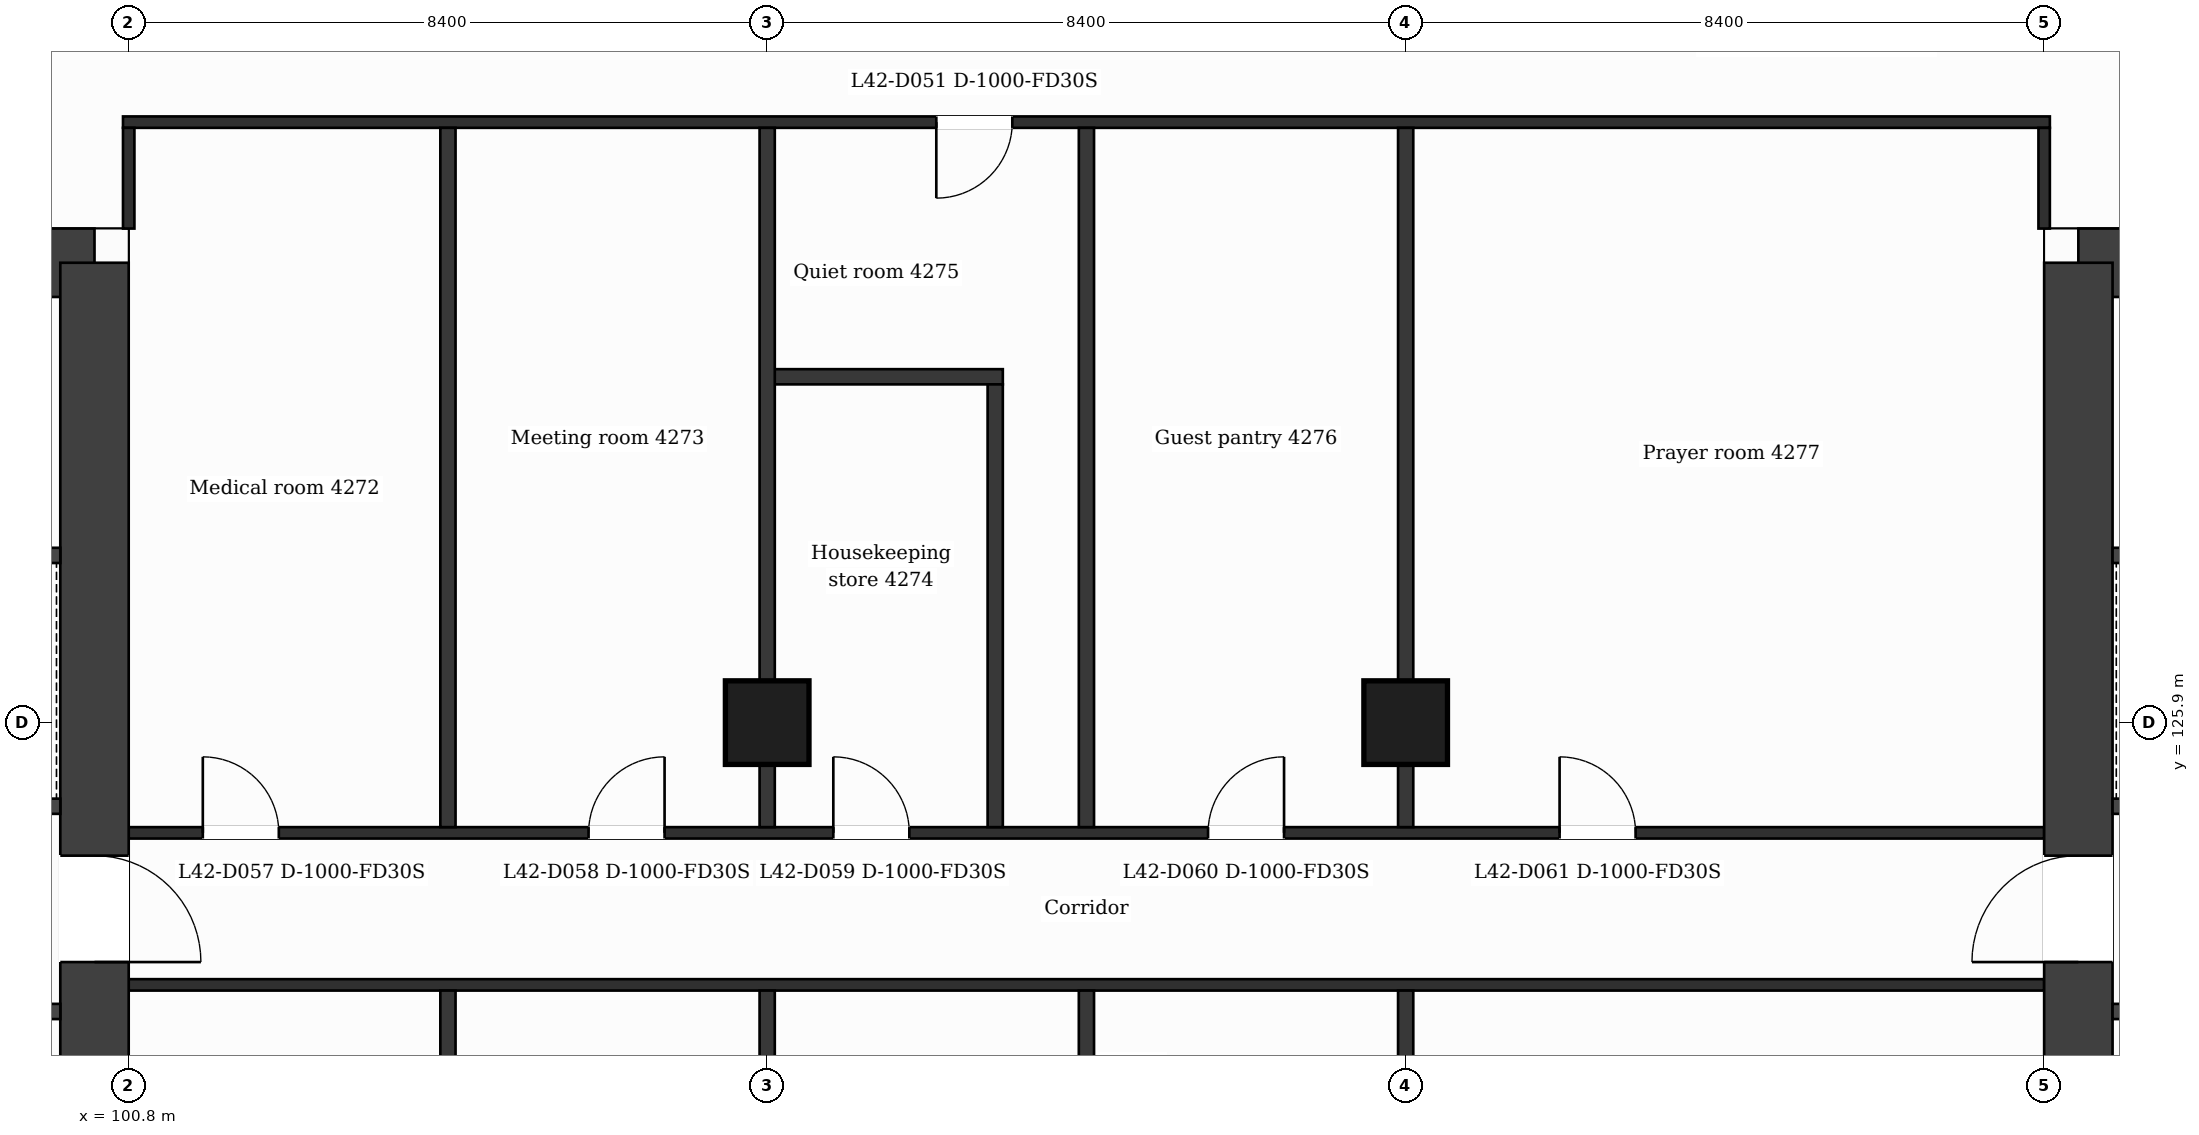
"""IFC4 building model, lengths in metres.
Left out: names, types, materials, properties, quantities, classifications, styles, units other than length and angle.
Written with IfcOpenShell. Run it as: python <this file> out.ifc"""

import sys

from ifc_helpers import new_model, si_unit, direction, frame, frame_2d, origin, origin_2d, place, context, subcontext, project, spatial, rectangle, extrude, element, fill, save


model = new_model("IFC4")
c1 = context("Model", 3, precision=1e-05, world=origin(), true_north=direction((0.0, 1.0)))
c2 = subcontext(c1, "Body", "Model", "MODEL_VIEW")
j1 = project(units=[si_unit("LENGTHUNIT", "METRE"), si_unit("PLANEANGLEUNIT", "RADIAN")], contexts=[c1])
p1 = place(None, origin())
s1 = spatial("IfcSite", under=j1, at=p1, CompositionType="ELEMENT")
p2 = place(p1, origin())
s2 = spatial("IfcBuilding", under=s1, at=p2, CompositionType="ELEMENT")
p3 = place(p2, frame((0.0, 0.0, 177.4)))
s3 = spatial("IfcBuildingStorey", under=s2, at=p3, CompositionType="ELEMENT", Elevation=177.4)
p4 = place(p3, frame((89.024, 131.95, 0.0), z_axis=(0.0, 0.0, 1.0), x_axis=(1.0, 0.0, 0.0)))
e1 = element("IfcWall", 1, at=p4, inside=s3, PredefinedType="SHEAR", context=c2, shape_type="SweptSolid", body=[
    extrude(rectangle(XDim=11.326, YDim=0.9, at=frame_2d((5.663, 0.0))), origin(), (0.0, 0.0, 1.0), 3.7),
])
p5 = place(p4, frame((6.739, 0.0, 0.0)))
e2 = element("IfcOpeningElement", 2, at=p5, cuts=e1, PredefinedType="OPENING", context=c2, shape_type="SweptSolid", body=[
    extrude(rectangle(XDim=1.2, YDim=2.1, at=frame_2d((0.6, 1.05))), frame((0.0, 0.46, 0.0), z_axis=(0.0, -1.0, 0.0), x_axis=(1.0, 0.0, 0.0)), (0.0, 0.0, 1.0), 0.92),
])
p6 = place(p3, frame((100.35, 131.95, 0.0), z_axis=(0.0, 0.0, 1.0), x_axis=(0.0, -1.0, 0.0)))
e3 = element("IfcWall", 3, at=p6, inside=s3, PredefinedType="SHEAR", context=c2, shape_type="SweptSolid", body=[
    extrude(rectangle(XDim=21.1, YDim=0.9, at=frame_2d((10.55, 0.0))), origin(), (0.0, 0.0, 1.0), 3.7),
])
p7 = place(p6, frame((7.8, 0.0, 0.0)))
e4 = element("IfcOpeningElement", 4, at=p7, cuts=e3, PredefinedType="OPENING", context=c2, shape_type="SweptSolid", body=[
    extrude(rectangle(XDim=1.4, YDim=2.1, at=frame_2d((0.7, 1.05))), frame((0.0, 0.46, 0.0), z_axis=(0.0, -1.0, 0.0), x_axis=(1.0, 0.0, 0.0)), (0.0, 0.0, 1.0), 0.92),
])
p8 = place(p3, frame((126.45, 131.95, 0.0), z_axis=(0.0, 0.0, 1.0), x_axis=(1.0, 0.0, 0.0)))
e5 = element("IfcWall", 5, at=p8, inside=s3, PredefinedType="SHEAR", context=c2, shape_type="SweptSolid", body=[
    extrude(rectangle(XDim=11.326, YDim=0.9, at=frame_2d((5.663, 0.0))), origin(), (0.0, 0.0, 1.0), 3.7),
])
p9 = place(p8, frame((3.386, 0.0, 0.0)))
e6 = element("IfcOpeningElement", 6, at=p9, cuts=e5, PredefinedType="OPENING", context=c2, shape_type="SweptSolid", body=[
    extrude(rectangle(XDim=1.2, YDim=2.1, at=frame_2d((0.6, 1.05))), frame((0.0, 0.46, 0.0), z_axis=(0.0, -1.0, 0.0), x_axis=(1.0, 0.0, 0.0)), (0.0, 0.0, 1.0), 0.92),
])
p10 = place(p3, frame((126.45, 110.85, 0.0), z_axis=(0.0, 0.0, 1.0), x_axis=(0.0, 1.0, 0.0)))
e7 = element("IfcWall", 7, at=p10, inside=s3, PredefinedType="SHEAR", context=c2, shape_type="SweptSolid", body=[
    extrude(rectangle(XDim=21.1, YDim=0.9, at=frame_2d((10.55, 0.0))), origin(), (0.0, 0.0, 1.0), 3.7),
])
p11 = place(p10, frame((11.9, 0.0, 0.0)))
e8 = element("IfcOpeningElement", 8, at=p11, cuts=e7, PredefinedType="OPENING", context=c2, shape_type="SweptSolid", body=[
    extrude(rectangle(XDim=1.4, YDim=2.1, at=frame_2d((0.7, 1.05))), frame((0.0, 0.46, 0.0), z_axis=(0.0, -1.0, 0.0), x_axis=(1.0, 0.0, 0.0)), (0.0, 0.0, 1.0), 0.92),
])
for number, where, z_axis, x_axis in (
    (9, (109.2, 125.9, 0.0), (0.0, 0.0, 1.0), (1.0, 0.0, 0.0)),
    (10, (117.6, 125.9, 0.0), (0.0, 0.0, 1.0), (1.0, 0.0, 0.0)),
):
    element("IfcColumn", number, at=place(p3, frame(where, z_axis=z_axis, x_axis=x_axis)), inside=s3, PredefinedType="COLUMN", context=c2, shape_type="SweptSolid", body=[
        extrude(rectangle(XDim=1.1, YDim=1.1, at=origin_2d()), origin(), (0.0, 0.0, 1.0), 3.7),
    ])
p12 = place(p3, frame((95.227, 122.1, 0.0), z_axis=(0.0, 0.0, 1.0), x_axis=(1.0, 0.0, 0.0)))
e11 = element("IfcWall", 11, at=p12, inside=s3, PredefinedType="PARTITIONING", context=c2, shape_type="SweptSolid", body=[
    extrude(rectangle(XDim=4.673, YDim=0.2, at=frame_2d((2.336, 0.0))), origin(), (0.0, 0.0, 1.0), 3.38),
])
p13 = place(p12, frame((0.902, 0.0, 0.0)))
e12 = element("IfcOpeningElement", 12, at=p13, cuts=e11, PredefinedType="OPENING", context=c2, shape_type="SweptSolid", body=[
    extrude(rectangle(XDim=0.9, YDim=2.1, at=frame_2d((0.45, 1.05))), frame((0.0, 0.11, 0.0), z_axis=(0.0, -1.0, 0.0), x_axis=(1.0, 0.0, 0.0)), (0.0, 0.0, 1.0), 0.22),
])
p14 = place(p12, frame((3.128, 0.0, 0.0)))
e13 = element("IfcOpeningElement", 13, at=p14, cuts=e11, PredefinedType="OPENING", context=c2, shape_type="SweptSolid", body=[
    extrude(rectangle(XDim=0.9, YDim=2.1, at=frame_2d((0.45, 1.05))), frame((0.0, 0.11, 0.0), z_axis=(0.0, -1.0, 0.0), x_axis=(1.0, 0.0, 0.0)), (0.0, 0.0, 1.0), 0.22),
])
p15 = place(p3, frame((126.9, 122.1, 0.0), z_axis=(0.0, 0.0, 1.0), x_axis=(1.0, 0.0, 0.0)))
e14 = element("IfcWall", 14, at=p15, inside=s3, PredefinedType="PARTITIONING", context=c2, shape_type="SweptSolid", body=[
    extrude(rectangle(XDim=4.673, YDim=0.2, at=frame_2d((2.336, 0.0))), origin(), (0.0, 0.0, 1.0), 3.38),
])
p16 = place(p15, frame((2.981, 0.0, 0.0)))
e15 = element("IfcOpeningElement", 15, at=p16, cuts=e14, PredefinedType="OPENING", context=c2, shape_type="SweptSolid", body=[
    extrude(rectangle(XDim=0.9, YDim=2.1, at=frame_2d((0.45, 1.05))), frame((0.0, 0.11, 0.0), z_axis=(0.0, -1.0, 0.0), x_axis=(1.0, 0.0, 0.0)), (0.0, 0.0, 1.0), 0.22),
])
p17 = place(p15, frame((0.645, 0.0, 0.0)))
e16 = element("IfcOpeningElement", 16, at=p17, cuts=e14, PredefinedType="OPENING", context=c2, shape_type="SweptSolid", body=[
    extrude(rectangle(XDim=0.9, YDim=2.1, at=frame_2d((0.45, 1.05))), frame((0.0, 0.11, 0.0), z_axis=(0.0, -1.0, 0.0), x_axis=(1.0, 0.0, 0.0)), (0.0, 0.0, 1.0), 0.22),
])
p18 = place(p3, frame((100.8, 122.45, 0.0), z_axis=(0.0, 0.0, 1.0), x_axis=(1.0, 0.0, 0.0)))
e17 = element("IfcWall", 17, at=p18, inside=s3, PredefinedType="PARTITIONING", context=c2, shape_type="SweptSolid", body=[
    extrude(rectangle(XDim=25.2, YDim=0.15, at=frame_2d((12.6, 0.0))), origin(), (0.0, 0.0, 1.0), 3.38),
])
p19 = place(p3, frame((100.8, 124.45, 0.0), z_axis=(0.0, 0.0, 1.0), x_axis=(1.0, 0.0, 0.0)))
e18 = element("IfcWall", 18, at=p19, inside=s3, PredefinedType="PARTITIONING", context=c2, shape_type="SweptSolid", body=[
    extrude(rectangle(XDim=25.2, YDim=0.15, at=frame_2d((12.6, 0.0))), origin(), (0.0, 0.0, 1.0), 3.38),
])
p20 = place(p19, frame((0.975, 0.0, 0.0)))
e19 = element("IfcOpeningElement", 19, at=p20, cuts=e18, PredefinedType="OPENING", context=c2, shape_type="SweptSolid", body=[
    extrude(rectangle(XDim=1.0, YDim=2.1, at=frame_2d((0.5, 1.05))), frame((0.0, 0.085, 0.0), z_axis=(0.0, -1.0, 0.0), x_axis=(1.0, 0.0, 0.0)), (0.0, 0.0, 1.0), 0.17),
])
p21 = place(p19, frame((6.05, 0.0, 0.0)))
e20 = element("IfcOpeningElement", 20, at=p21, cuts=e18, PredefinedType="OPENING", context=c2, shape_type="SweptSolid", body=[
    extrude(rectangle(XDim=1.0, YDim=2.1, at=frame_2d((0.5, 1.05))), frame((0.0, 0.085, 0.0), z_axis=(0.0, -1.0, 0.0), x_axis=(1.0, 0.0, 0.0)), (0.0, 0.0, 1.0), 0.17),
])
p22 = place(p19, frame((9.27, 0.0, 0.0)))
e21 = element("IfcOpeningElement", 21, at=p22, cuts=e18, PredefinedType="OPENING", context=c2, shape_type="SweptSolid", body=[
    extrude(rectangle(XDim=1.0, YDim=2.1, at=frame_2d((0.5, 1.05))), frame((0.0, 0.085, 0.0), z_axis=(0.0, -1.0, 0.0), x_axis=(1.0, 0.0, 0.0)), (0.0, 0.0, 1.0), 0.17),
])
p23 = place(p19, frame((14.2, 0.0, 0.0)))
e22 = element("IfcOpeningElement", 22, at=p23, cuts=e18, PredefinedType="OPENING", context=c2, shape_type="SweptSolid", body=[
    extrude(rectangle(XDim=1.0, YDim=2.1, at=frame_2d((0.5, 1.05))), frame((0.0, 0.085, 0.0), z_axis=(0.0, -1.0, 0.0), x_axis=(1.0, 0.0, 0.0)), (0.0, 0.0, 1.0), 0.17),
])
p24 = place(p19, frame((18.825, 0.0, 0.0)))
e23 = element("IfcOpeningElement", 23, at=p24, cuts=e18, PredefinedType="OPENING", context=c2, shape_type="SweptSolid", body=[
    extrude(rectangle(XDim=1.0, YDim=2.1, at=frame_2d((0.5, 1.05))), frame((0.0, 0.085, 0.0), z_axis=(0.0, -1.0, 0.0), x_axis=(1.0, 0.0, 0.0)), (0.0, 0.0, 1.0), 0.17),
])
p25 = place(p3, frame((92.702, 124.8, 0.0), z_axis=(0.0, 0.0, 1.0), x_axis=(1.0, 0.0, 0.0)))
e24 = element("IfcWall", 24, at=p25, inside=s3, PredefinedType="PARTITIONING", context=c2, shape_type="SweptSolid", body=[
    extrude(rectangle(XDim=7.198, YDim=0.2, at=frame_2d((3.599, 0.0))), origin(), (0.0, 0.0, 1.0), 3.38),
])
p26 = place(p25, frame((5.469, 0.0, 0.0)))
e25 = element("IfcOpeningElement", 25, at=p26, cuts=e24, PredefinedType="OPENING", context=c2, shape_type="SweptSolid", body=[
    extrude(rectangle(XDim=1.1, YDim=2.1, at=frame_2d((0.55, 1.05))), frame((0.0, 0.11, 0.0), z_axis=(0.0, -1.0, 0.0), x_axis=(1.0, 0.0, 0.0)), (0.0, 0.0, 1.0), 0.22),
])
p27 = place(p3, frame((126.9, 124.8, 0.0), z_axis=(0.0, 0.0, 1.0), x_axis=(1.0, 0.0, 0.0)))
e26 = element("IfcWall", 26, at=p27, inside=s3, PredefinedType="PARTITIONING", context=c2, shape_type="SweptSolid", body=[
    extrude(rectangle(XDim=4.715, YDim=0.2, at=frame_2d((2.358, 0.0))), origin(), (0.0, 0.0, 1.0), 3.38),
])
p28 = place(p27, frame((0.685, 0.0, 0.0)))
e27 = element("IfcOpeningElement", 27, at=p28, cuts=e26, PredefinedType="OPENING", context=c2, shape_type="SweptSolid", body=[
    extrude(rectangle(XDim=1.1, YDim=2.1, at=frame_2d((0.55, 1.05))), frame((0.0, 0.11, 0.0), z_axis=(0.0, -1.0, 0.0), x_axis=(1.0, 0.0, 0.0)), (0.0, 0.0, 1.0), 0.22),
])
p29 = place(p3, frame((92.827, 128.1, 0.0), z_axis=(0.0, 0.0, 1.0), x_axis=(1.0, 0.0, 0.0)))
e28 = element("IfcWall", 28, at=p29, inside=s3, PredefinedType="PARTITIONING", context=c2, shape_type="SweptSolid", body=[
    extrude(rectangle(XDim=7.073, YDim=0.2, at=frame_2d((3.537, 0.0))), origin(), (0.0, 0.0, 1.0), 3.38),
])
p30 = place(p29, frame((2.847, 0.0, 0.0)))
e29 = element("IfcOpeningElement", 29, at=p30, cuts=e28, PredefinedType="OPENING", context=c2, shape_type="SweptSolid", body=[
    extrude(rectangle(XDim=1.1, YDim=2.1, at=frame_2d((0.55, 1.05))), frame((0.0, 0.11, 0.0), z_axis=(0.0, -1.0, 0.0), x_axis=(1.0, 0.0, 0.0)), (0.0, 0.0, 1.0), 0.22),
])
p31 = place(p3, frame((126.9, 128.1, 0.0), z_axis=(0.0, 0.0, 1.0), x_axis=(1.0, 0.0, 0.0)))
e30 = element("IfcWall", 30, at=p31, inside=s3, PredefinedType="PARTITIONING", context=c2, shape_type="SweptSolid", body=[
    extrude(rectangle(XDim=4.715, YDim=0.2, at=frame_2d((2.358, 0.0))), origin(), (0.0, 0.0, 1.0), 3.38),
])
p32 = place(p31, frame((2.931, 0.0, 0.0)))
e31 = element("IfcOpeningElement", 31, at=p32, cuts=e30, PredefinedType="OPENING", context=c2, shape_type="SweptSolid", body=[
    extrude(rectangle(XDim=1.1, YDim=2.1, at=frame_2d((0.55, 1.05))), frame((0.0, 0.11, 0.0), z_axis=(0.0, -1.0, 0.0), x_axis=(1.0, 0.0, 0.0)), (0.0, 0.0, 1.0), 0.22),
])
p33 = place(p3, frame((109.2, 130.45, 0.0), z_axis=(0.0, 0.0, 1.0), x_axis=(1.0, 0.0, 0.0)))
e32 = element("IfcWall", 32, at=p33, inside=s3, PredefinedType="PARTITIONING", context=c2, shape_type="SweptSolid", body=[
    extrude(rectangle(XDim=3.1, YDim=0.2, at=frame_2d((1.55, 0.0))), origin(), (0.0, 0.0, 1.0), 3.38),
])
p34 = place(p3, frame((100.725, 133.8, 0.0), z_axis=(0.0, 0.0, 1.0), x_axis=(1.0, 0.0, 0.0)))
e33 = element("IfcWall", 33, at=p34, inside=s3, PredefinedType="PARTITIONING", context=c2, shape_type="SweptSolid", body=[
    extrude(rectangle(XDim=25.35, YDim=0.15, at=frame_2d((12.675, 0.0))), origin(), (0.0, 0.0, 1.0), 3.38),
])
p35 = place(p34, frame((10.7, 0.0, 0.0)))
e34 = element("IfcOpeningElement", 34, at=p35, cuts=e33, PredefinedType="OPENING", context=c2, shape_type="SweptSolid", body=[
    extrude(rectangle(XDim=1.0, YDim=2.1, at=frame_2d((0.5, 1.05))), frame((0.0, 0.085, 0.0), z_axis=(0.0, -1.0, 0.0), x_axis=(1.0, 0.0, 0.0)), (0.0, 0.0, 1.0), 0.17),
])
p36 = place(p3, frame((100.8, 132.4, 0.0), z_axis=(0.0, 0.0, 1.0), x_axis=(0.0, 1.0, 0.0)))
e35 = element("IfcWall", 35, at=p36, inside=s3, PredefinedType="PARTITIONING", context=c2, shape_type="SweptSolid", body=[
    extrude(rectangle(XDim=1.325, YDim=0.15, at=frame_2d((0.663, 0.0))), origin(), (0.0, 0.0, 1.0), 3.38),
])
p37 = place(p3, frame((105.0, 109.075, 0.0), z_axis=(0.0, 0.0, 1.0), x_axis=(0.0, 1.0, 0.0)))
e36 = element("IfcWall", 36, at=p37, inside=s3, PredefinedType="PARTITIONING", context=c2, shape_type="SweptSolid", body=[
    extrude(rectangle(XDim=13.3, YDim=0.2, at=frame_2d((6.65, 0.0))), origin(), (0.0, 0.0, 1.0), 3.38),
])
p38 = place(p3, frame((105.0, 124.525, 0.0), z_axis=(0.0, 0.0, 1.0), x_axis=(0.0, 1.0, 0.0)))
e37 = element("IfcWall", 37, at=p38, inside=s3, PredefinedType="PARTITIONING", context=c2, shape_type="SweptSolid", body=[
    extrude(rectangle(XDim=9.2, YDim=0.2, at=frame_2d((4.6, 0.0))), origin(), (0.0, 0.0, 1.0), 3.38),
])
p39 = place(p3, frame((109.2, 109.075, 0.0), z_axis=(0.0, 0.0, 1.0), x_axis=(0.0, 1.0, 0.0)))
e38 = element("IfcWall", 38, at=p39, inside=s3, PredefinedType="PARTITIONING", context=c2, shape_type="SweptSolid", body=[
    extrude(rectangle(XDim=13.3, YDim=0.2, at=frame_2d((6.65, 0.0))), origin(), (0.0, 0.0, 1.0), 3.38),
])
p40 = place(p3, frame((109.2, 124.525, 0.0), z_axis=(0.0, 0.0, 1.0), x_axis=(0.0, 1.0, 0.0)))
e39 = element("IfcWall", 39, at=p40, inside=s3, PredefinedType="PARTITIONING", context=c2, shape_type="SweptSolid", body=[
    extrude(rectangle(XDim=9.2, YDim=0.2, at=frame_2d((4.6, 0.0))), origin(), (0.0, 0.0, 1.0), 3.38),
])
p41 = place(p3, frame((112.2, 124.525, 0.0), z_axis=(0.0, 0.0, 1.0), x_axis=(0.0, 1.0, 0.0)))
e40 = element("IfcWall", 40, at=p41, inside=s3, PredefinedType="PARTITIONING", context=c2, shape_type="SweptSolid", body=[
    extrude(rectangle(XDim=5.825, YDim=0.2, at=frame_2d((2.913, 0.0))), origin(), (0.0, 0.0, 1.0), 3.38),
])
p42 = place(p3, frame((113.4, 109.075, 0.0), z_axis=(0.0, 0.0, 1.0), x_axis=(0.0, 1.0, 0.0)))
e41 = element("IfcWall", 41, at=p42, inside=s3, PredefinedType="PARTITIONING", context=c2, shape_type="SweptSolid", body=[
    extrude(rectangle(XDim=13.3, YDim=0.2, at=frame_2d((6.65, 0.0))), origin(), (0.0, 0.0, 1.0), 3.38),
])
p43 = place(p3, frame((113.4, 124.525, 0.0), z_axis=(0.0, 0.0, 1.0), x_axis=(0.0, 1.0, 0.0)))
e42 = element("IfcWall", 42, at=p43, inside=s3, PredefinedType="PARTITIONING", context=c2, shape_type="SweptSolid", body=[
    extrude(rectangle(XDim=9.2, YDim=0.2, at=frame_2d((4.6, 0.0))), origin(), (0.0, 0.0, 1.0), 3.38),
])
p44 = place(p3, frame((117.6, 109.075, 0.0), z_axis=(0.0, 0.0, 1.0), x_axis=(0.0, 1.0, 0.0)))
e43 = element("IfcWall", 43, at=p44, inside=s3, PredefinedType="PARTITIONING", context=c2, shape_type="SweptSolid", body=[
    extrude(rectangle(XDim=13.3, YDim=0.2, at=frame_2d((6.65, 0.0))), origin(), (0.0, 0.0, 1.0), 3.38),
])
p45 = place(p3, frame((117.6, 124.525, 0.0), z_axis=(0.0, 0.0, 1.0), x_axis=(0.0, 1.0, 0.0)))
e44 = element("IfcWall", 44, at=p45, inside=s3, PredefinedType="PARTITIONING", context=c2, shape_type="SweptSolid", body=[
    extrude(rectangle(XDim=9.2, YDim=0.2, at=frame_2d((4.6, 0.0))), origin(), (0.0, 0.0, 1.0), 3.38),
])
p46 = place(p3, frame((126.0, 132.4, 0.0), z_axis=(0.0, 0.0, 1.0), x_axis=(0.0, 1.0, 0.0)))
e45 = element("IfcWall", 45, at=p46, inside=s3, PredefinedType="PARTITIONING", context=c2, shape_type="SweptSolid", body=[
    extrude(rectangle(XDim=1.325, YDim=0.15, at=frame_2d((0.663, 0.0))), origin(), (0.0, 0.0, 1.0), 3.38),
])
p47 = place(p35, origin())
e46 = element("IfcDoor", 46, at=p47, inside=s3, OperationType="SINGLE_SWING_LEFT", PredefinedType="DOOR", context=c2, shape_type="SweptSolid", body=[
    extrude(rectangle(XDim=1.0, YDim=2.1, at=frame_2d((0.5, 1.05))), frame((0.0, 0.025, 0.0), z_axis=(0.0, -1.0, 0.0), x_axis=(1.0, 0.0, 0.0)), (0.0, 0.0, 1.0), 0.05),
])
fill(e34, e46)
p48 = place(p20, origin())
e47 = element("IfcDoor", 47, at=p48, inside=s3, OperationType="SINGLE_SWING_LEFT", PredefinedType="DOOR", context=c2, shape_type="SweptSolid", body=[
    extrude(rectangle(XDim=1.0, YDim=2.1, at=frame_2d((0.5, 1.05))), frame((0.0, 0.025, 0.0), z_axis=(0.0, -1.0, 0.0), x_axis=(1.0, 0.0, 0.0)), (0.0, 0.0, 1.0), 0.05),
])
fill(e19, e47)
p49 = place(p21, origin())
e48 = element("IfcDoor", 48, at=p49, inside=s3, OperationType="SINGLE_SWING_RIGHT", PredefinedType="DOOR", context=c2, shape_type="SweptSolid", body=[
    extrude(rectangle(XDim=1.0, YDim=2.1, at=frame_2d((0.5, 1.05))), frame((0.0, 0.025, 0.0), z_axis=(0.0, -1.0, 0.0), x_axis=(1.0, 0.0, 0.0)), (0.0, 0.0, 1.0), 0.05),
])
fill(e20, e48)
p50 = place(p22, origin())
e49 = element("IfcDoor", 49, at=p50, inside=s3, OperationType="SINGLE_SWING_LEFT", PredefinedType="DOOR", context=c2, shape_type="SweptSolid", body=[
    extrude(rectangle(XDim=1.0, YDim=2.1, at=frame_2d((0.5, 1.05))), frame((0.0, 0.025, 0.0), z_axis=(0.0, -1.0, 0.0), x_axis=(1.0, 0.0, 0.0)), (0.0, 0.0, 1.0), 0.05),
])
fill(e21, e49)
p51 = place(p23, origin())
e50 = element("IfcDoor", 50, at=p51, inside=s3, OperationType="SINGLE_SWING_RIGHT", PredefinedType="DOOR", context=c2, shape_type="SweptSolid", body=[
    extrude(rectangle(XDim=1.0, YDim=2.1, at=frame_2d((0.5, 1.05))), frame((0.0, 0.025, 0.0), z_axis=(0.0, -1.0, 0.0), x_axis=(1.0, 0.0, 0.0)), (0.0, 0.0, 1.0), 0.05),
])
fill(e22, e50)
p52 = place(p24, origin())
e51 = element("IfcDoor", 51, at=p52, inside=s3, OperationType="SINGLE_SWING_LEFT", PredefinedType="DOOR", context=c2, shape_type="SweptSolid", body=[
    extrude(rectangle(XDim=1.0, YDim=2.1, at=frame_2d((0.5, 1.05))), frame((0.0, 0.025, 0.0), z_axis=(0.0, -1.0, 0.0), x_axis=(1.0, 0.0, 0.0)), (0.0, 0.0, 1.0), 0.05),
])
fill(e23, e51)
p53 = place(p7, origin())
e52 = element("IfcDoor", 52, at=p53, inside=s3, OperationType="SINGLE_SWING_RIGHT", PredefinedType="DOOR", context=c2, shape_type="SweptSolid", body=[
    extrude(rectangle(XDim=1.4, YDim=2.1, at=frame_2d((0.7, 1.05))), frame((0.0, 0.025, 0.0), z_axis=(0.0, -1.0, 0.0), x_axis=(1.0, 0.0, 0.0)), (0.0, 0.0, 1.0), 0.05),
])
fill(e4, e52)
p54 = place(p11, origin())
e53 = element("IfcDoor", 53, at=p54, inside=s3, OperationType="SINGLE_SWING_LEFT", PredefinedType="DOOR", context=c2, shape_type="SweptSolid", body=[
    extrude(rectangle(XDim=1.4, YDim=2.1, at=frame_2d((0.7, 1.05))), frame((0.0, 0.025, 0.0), z_axis=(0.0, -1.0, 0.0), x_axis=(1.0, 0.0, 0.0)), (0.0, 0.0, 1.0), 0.05),
])
fill(e8, e53)
save(model, sys.argv[1])
